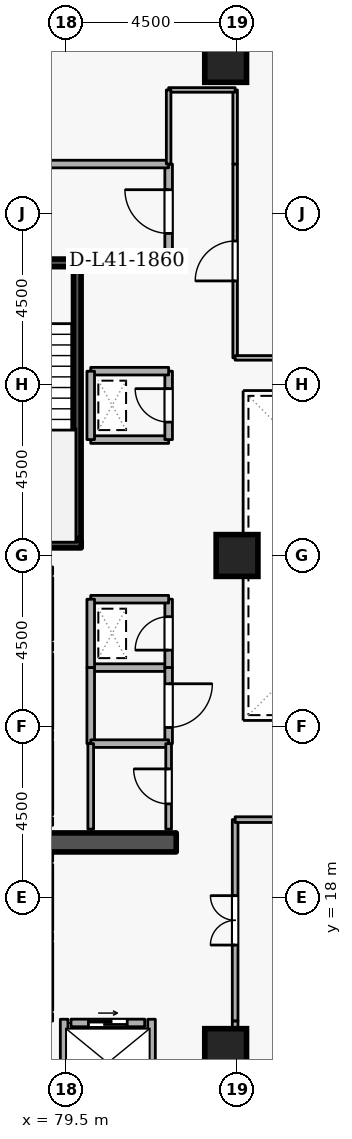
"""IFC4 building model, lengths in metres.
Left out: names, types, materials, properties, quantities, classifications, styles, units other than length and angle.
Written with IfcOpenShell. Run it as: python <this file> out.ifc"""

import sys

from ifc_helpers import new_model, si_unit, direction, frame, frame_2d, origin, origin_2d, place, context, subcontext, project, spatial, rectangle, extrude, element, fill, save


model = new_model("IFC4")
c1 = context("Model", 3, precision=1e-05, world=origin(), true_north=direction((0.0, 1.0)))
c2 = subcontext(c1, "Body", "Model", "MODEL_VIEW")
j1 = project(units=[si_unit("LENGTHUNIT", "METRE"), si_unit("PLANEANGLEUNIT", "RADIAN")], contexts=[c1])
p1 = place(None, origin())
s1 = spatial("IfcSite", under=j1, at=p1, CompositionType="ELEMENT")
p2 = place(p1, origin())
s2 = spatial("IfcBuilding", under=s1, at=p2, CompositionType="ELEMENT")
p3 = place(p2, frame((0.0, 0.0, 156.3)))
s3 = spatial("IfcBuildingStorey", under=s2, at=p3, CompositionType="ELEMENT", Elevation=156.3)
p4 = place(p3, frame((76.6, 19.45, 0.0), z_axis=(0.0, 0.0, 1.0), x_axis=(1.0, 0.0, 0.0)))
e1 = element("IfcWall", 1, at=p4, inside=s3, PredefinedType="SHEAR", context=c2, shape_type="SweptSolid", body=[
    extrude(rectangle(XDim=5.8, YDim=0.5, at=frame_2d((2.9, 0.0))), origin(), (0.0, 0.0, 1.0), 3.6),
])
for number, where, z_axis, x_axis in (
    (2, (83.7, 14.0, 0.0), (0.0, 0.0, 1.0), (1.0, 0.0, 0.0)),
    (3, (83.7, 40.0, 0.0), (0.0, 0.0, 1.0), (1.0, 0.0, 0.0)),
    (4, (84.0, 27.0, 0.0), (0.0, 0.0, 1.0), (1.0, 0.0, 0.0)),
):
    element("IfcColumn", number, at=place(p3, frame(where, z_axis=z_axis, x_axis=x_axis)), inside=s3, PredefinedType="COLUMN", context=c2, shape_type="SweptSolid", body=[
        extrude(rectangle(XDim=1.1, YDim=1.1, at=origin_2d()), origin(), (0.0, 0.0, 1.0), 3.6),
    ])
p5 = place(p3, frame((79.05, 24.78, 0.0), z_axis=(0.0, 0.0, 1.0), x_axis=(0.0, 1.0, 0.0)))
e5 = element("IfcWall", 5, at=p5, inside=s3, PredefinedType="STANDARD", context=c2, shape_type="SweptSolid", body=[
    extrude(rectangle(XDim=1.64, YDim=0.2, at=frame_2d((0.82, 0.0))), origin(), (0.0, 0.0, 1.0), 3.34),
])
p6 = place(p5, frame((0.31, 0.0, 0.0)))
e6 = element("IfcOpeningElement", 6, at=p6, cuts=e5, PredefinedType="OPENING", context=c2, shape_type="SweptSolid", body=[
    extrude(rectangle(XDim=1.02, YDim=2.06, at=frame_2d((0.51, 1.03))), frame((0.0, 0.11, 0.0), z_axis=(0.0, -1.0, 0.0), x_axis=(1.0, 0.0, 0.0)), (0.0, 0.0, 1.0), 0.22),
])
p7 = place(p3, frame((79.05, 22.43, 0.0), z_axis=(0.0, 0.0, 1.0), x_axis=(0.0, 1.0, 0.0)))
e7 = element("IfcWall", 7, at=p7, inside=s3, PredefinedType="STANDARD", context=c2, shape_type="SweptSolid", body=[
    extrude(rectangle(XDim=1.99, YDim=0.2, at=frame_2d((0.995, 0.0))), origin(), (0.0, 0.0, 1.0), 3.34),
])
p8 = place(p3, frame((79.05, 20.18, 0.0), z_axis=(0.0, 0.0, 1.0), x_axis=(0.0, 1.0, 0.0)))
e8 = element("IfcWall", 8, at=p8, inside=s3, PredefinedType="STANDARD", context=c2, shape_type="SweptSolid", body=[
    extrude(rectangle(XDim=1.94, YDim=0.2, at=frame_2d((0.97, 0.0))), origin(), (0.0, 0.0, 1.0), 3.34),
])
p9 = place(p3, frame((79.05, 17.13, 0.0), z_axis=(0.0, 0.0, 1.0), x_axis=(0.0, 1.0, 0.0)))
e9 = element("IfcWall", 9, at=p9, inside=s3, PredefinedType="STANDARD", context=c2, shape_type="SweptSolid", body=[
    extrude(rectangle(XDim=1.74, YDim=0.2, at=frame_2d((0.87, 0.0))), origin(), (0.0, 0.0, 1.0), 3.34),
])
p10 = place(p9, frame((0.36, 0.0, 0.0)))
e10 = element("IfcOpeningElement", 10, at=p10, cuts=e9, PredefinedType="OPENING", context=c2, shape_type="SweptSolid", body=[
    extrude(rectangle(XDim=1.02, YDim=2.06, at=frame_2d((0.51, 1.03))), frame((0.0, 0.11, 0.0), z_axis=(0.0, -1.0, 0.0), x_axis=(1.0, 0.0, 0.0)), (0.0, 0.0, 1.0), 0.22),
])
p11 = place(p3, frame((79.05, 15.03, 0.0), z_axis=(0.0, 0.0, 1.0), x_axis=(0.0, 1.0, 0.0)))
e11 = element("IfcWall", 11, at=p11, inside=s3, PredefinedType="STANDARD", context=c2, shape_type="SweptSolid", body=[
    extrude(rectangle(XDim=1.79, YDim=0.2, at=frame_2d((0.895, 0.0))), origin(), (0.0, 0.0, 1.0), 3.34),
])
p12 = place(p11, frame((0.385, 0.0, 0.0)))
e12 = element("IfcOpeningElement", 12, at=p12, cuts=e11, PredefinedType="OPENING", context=c2, shape_type="SweptSolid", body=[
    extrude(rectangle(XDim=1.02, YDim=2.06, at=frame_2d((0.51, 1.03))), frame((0.0, 0.11, 0.0), z_axis=(0.0, -1.0, 0.0), x_axis=(1.0, 0.0, 0.0)), (0.0, 0.0, 1.0), 0.22),
])
p13 = place(p3, frame((79.63, 14.7, 0.0), z_axis=(0.0, 0.0, 1.0), x_axis=(1.0, 0.0, 0.0)))
e13 = element("IfcWall", 13, at=p13, inside=s3, PredefinedType="STANDARD", context=c2, shape_type="SweptSolid", body=[
    extrude(rectangle(XDim=1.94, YDim=0.2, at=frame_2d((0.97, 0.0))), origin(), (0.0, 0.0, 1.0), 3.34),
])
p14 = place(p13, frame((0.46, 0.0, 0.0)))
e14 = element("IfcOpeningElement", 14, at=p14, cuts=e13, PredefinedType="OPENING", context=c2, shape_type="SweptSolid", body=[
    extrude(rectangle(XDim=1.02, YDim=2.06, at=frame_2d((0.51, 1.03))), frame((0.0, 0.11, 0.0), z_axis=(0.0, -1.0, 0.0), x_axis=(1.0, 0.0, 0.0)), (0.0, 0.0, 1.0), 0.22),
])
for number, where, z_axis, x_axis in (
    (15, (81.75, 12.612, 0.0), (0.0, 0.0, 1.0), (0.0, 1.0, 0.0)),
    (16, (79.45, 12.612, 0.0), (0.0, 0.0, 1.0), (0.0, 1.0, 0.0)),
):
    element("IfcWall", number, at=place(p3, frame(where, z_axis=z_axis, x_axis=x_axis)), inside=s3, PredefinedType="STANDARD", context=c2, shape_type="SweptSolid", body=[
        extrude(rectangle(XDim=2.186, YDim=0.2, at=frame_2d((1.093, 0.0))), origin(), (0.0, 0.0, 1.0), 3.34),
    ])
p15 = place(p3, frame((76.55, 34.7, 0.0), z_axis=(0.0, 0.0, 1.0), x_axis=(1.0, 0.0, 0.0)))
e17 = element("IfcWall", 17, at=p15, inside=s3, PredefinedType="SHEAR", context=c2, shape_type="SweptSolid", body=[
    extrude(rectangle(XDim=3.35, YDim=0.2, at=frame_2d((1.675, 0.0))), origin(), (0.0, 0.0, 1.0), 3.6),
])
p16 = place(p15, frame((1.125, 0.0, 0.0)))
e18 = element("IfcOpeningElement", 18, at=p16, cuts=e17, PredefinedType="OPENING", context=c2, shape_type="SweptSolid", body=[
    extrude(rectangle(XDim=1.1, YDim=2.1, at=frame_2d((0.55, 1.05))), frame((0.0, 0.11, 0.0), z_axis=(0.0, -1.0, 0.0), x_axis=(1.0, 0.0, 0.0)), (0.0, 0.0, 1.0), 0.22),
])
p17 = place(p3, frame((79.9, 27.3, 0.0), z_axis=(0.0, 0.0, 1.0), x_axis=(-1.0, 0.0, 0.0)))
e19 = element("IfcWall", 19, at=p17, inside=s3, PredefinedType="SHEAR", context=c2, shape_type="SweptSolid", body=[
    extrude(rectangle(XDim=3.35, YDim=0.2, at=frame_2d((1.675, 0.0))), origin(), (0.0, 0.0, 1.0), 3.6),
])
p18 = place(p3, frame((79.797, 27.45, 0.0), z_axis=(0.0, 0.0, 1.0), x_axis=(0.0, 1.0, 0.0)))
e20 = element("IfcWall", 20, at=p18, inside=s3, PredefinedType="SHEAR", context=c2, shape_type="SweptSolid", body=[
    extrude(rectangle(XDim=7.1, YDim=0.2, at=frame_2d((3.55, 0.0))), origin(), (0.0, 0.0, 1.0), 3.6),
])
p19 = place(p3, frame((79.9, 34.8, 0.0), z_axis=(0.0, 0.0, 1.0), x_axis=(1.0, 0.0, 0.0)))
e21 = element("IfcWall", 21, at=p19, inside=s3, PredefinedType="STANDARD", context=c2, shape_type="SweptSolid", body=[
    extrude(rectangle(XDim=2.3, YDim=0.2, at=frame_2d((1.15, 0.0))), origin(), (0.0, 0.0, 1.0), 2.545),
])
p20 = place(p3, frame((82.2, 34.8, 0.0), z_axis=(0.0, 0.0, 1.0), x_axis=(0.0, 1.0, 0.0)))
e22 = element("IfcWall", 22, at=p20, inside=s3, PredefinedType="STANDARD", context=c2, shape_type="SweptSolid", body=[
    extrude(rectangle(XDim=2.5, YDim=0.2, at=frame_2d((1.25, 0.0))), origin(), (0.0, 0.0, 1.0), 3.34),
])
p21 = place(p20, frame((0.675, 0.0, 0.0)))
e23 = element("IfcOpeningElement", 23, at=p21, cuts=e22, PredefinedType="OPENING", context=c2, shape_type="SweptSolid", body=[
    extrude(rectangle(XDim=1.15, YDim=2.1, at=frame_2d((0.575, 1.05))), frame((0.0, 0.11, 0.0), z_axis=(0.0, -1.0, 0.0), x_axis=(1.0, 0.0, 0.0)), (0.0, 0.0, 1.0), 0.22),
])
p22 = place(p3, frame((82.2, 37.3, 0.0), z_axis=(0.0, 0.0, 1.0), x_axis=(-1.0, 0.0, 0.0)))
e24 = element("IfcWall", 24, at=p22, inside=s3, PredefinedType="STANDARD", context=c2, shape_type="SweptSolid", body=[
    extrude(rectangle(XDim=5.7, YDim=0.2, at=frame_2d((2.85, 0.0))), origin(), (0.0, 0.0, 1.0), 3.34),
])
p23 = place(p3, frame((80.15, 24.05, 0.0), z_axis=(0.0, 0.0, 1.0), x_axis=(1.0, 0.0, 0.0)))
e25 = element("IfcWall", 25, at=p23, inside=s3, PredefinedType="STANDARD", context=c2, shape_type="SweptSolid", body=[
    extrude(rectangle(XDim=2.05, YDim=0.2, at=frame_2d((1.025, 0.0))), origin(), (0.0, 0.0, 1.0), 3.34),
])
p24 = place(p3, frame((82.2, 24.05, 0.0), z_axis=(0.0, 0.0, 1.0), x_axis=(0.0, 1.0, 0.0)))
e26 = element("IfcWall", 26, at=p24, inside=s3, PredefinedType="STANDARD", context=c2, shape_type="SweptSolid", body=[
    extrude(rectangle(XDim=1.8, YDim=0.2, at=frame_2d((0.9, 0.0))), origin(), (0.0, 0.0, 1.0), 3.34),
])
p25 = place(p24, frame((0.46, 0.0, 0.0)))
e27 = element("IfcOpeningElement", 27, at=p25, cuts=e26, PredefinedType="OPENING", context=c2, shape_type="SweptSolid", body=[
    extrude(rectangle(XDim=0.88, YDim=2.04, at=frame_2d((0.44, 1.02))), frame((0.0, 0.11, 0.0), z_axis=(0.0, -1.0, 0.0), x_axis=(1.0, 0.0, 0.0)), (0.0, 0.0, 1.0), 0.22),
])
p26 = place(p3, frame((82.2, 25.85, 0.0), z_axis=(0.0, 0.0, 1.0), x_axis=(-1.0, 0.0, 0.0)))
e28 = element("IfcWall", 28, at=p26, inside=s3, PredefinedType="STANDARD", context=c2, shape_type="SweptSolid", body=[
    extrude(rectangle(XDim=2.05, YDim=0.2, at=frame_2d((1.025, 0.0))), origin(), (0.0, 0.0, 1.0), 3.34),
])
p27 = place(p3, frame((80.15, 25.85, 0.0), z_axis=(0.0, 0.0, 1.0), x_axis=(0.0, -1.0, 0.0)))
e29 = element("IfcWall", 29, at=p27, inside=s3, PredefinedType="STANDARD", context=c2, shape_type="SweptSolid", body=[
    extrude(rectangle(XDim=1.8, YDim=0.2, at=frame_2d((0.9, 0.0))), origin(), (0.0, 0.0, 1.0), 3.34),
])
p28 = place(p3, frame((80.15, 30.05, 0.0), z_axis=(0.0, 0.0, 1.0), x_axis=(1.0, 0.0, 0.0)))
e30 = element("IfcWall", 30, at=p28, inside=s3, PredefinedType="STANDARD", context=c2, shape_type="SweptSolid", body=[
    extrude(rectangle(XDim=2.05, YDim=0.2, at=frame_2d((1.025, 0.0))), origin(), (0.0, 0.0, 1.0), 3.34),
])
p29 = place(p3, frame((82.2, 30.05, 0.0), z_axis=(0.0, 0.0, 1.0), x_axis=(0.0, 1.0, 0.0)))
e31 = element("IfcWall", 31, at=p29, inside=s3, PredefinedType="STANDARD", context=c2, shape_type="SweptSolid", body=[
    extrude(rectangle(XDim=1.8, YDim=0.2, at=frame_2d((0.9, 0.0))), origin(), (0.0, 0.0, 1.0), 3.34),
])
p30 = place(p29, frame((0.46, 0.0, 0.0)))
e32 = element("IfcOpeningElement", 32, at=p30, cuts=e31, PredefinedType="OPENING", context=c2, shape_type="SweptSolid", body=[
    extrude(rectangle(XDim=0.88, YDim=2.04, at=frame_2d((0.44, 1.02))), frame((0.0, 0.11, 0.0), z_axis=(0.0, -1.0, 0.0), x_axis=(1.0, 0.0, 0.0)), (0.0, 0.0, 1.0), 0.22),
])
p31 = place(p3, frame((82.2, 31.85, 0.0), z_axis=(0.0, 0.0, 1.0), x_axis=(-1.0, 0.0, 0.0)))
e33 = element("IfcWall", 33, at=p31, inside=s3, PredefinedType="STANDARD", context=c2, shape_type="SweptSolid", body=[
    extrude(rectangle(XDim=2.05, YDim=0.2, at=frame_2d((1.025, 0.0))), origin(), (0.0, 0.0, 1.0), 3.34),
])
p32 = place(p3, frame((80.15, 31.85, 0.0), z_axis=(0.0, 0.0, 1.0), x_axis=(0.0, -1.0, 0.0)))
e34 = element("IfcWall", 34, at=p32, inside=s3, PredefinedType="STANDARD", context=c2, shape_type="SweptSolid", body=[
    extrude(rectangle(XDim=1.8, YDim=0.2, at=frame_2d((0.9, 0.0))), origin(), (0.0, 0.0, 1.0), 3.34),
])
p33 = place(p3, frame((80.15, 22.05, 0.0), z_axis=(0.0, 0.0, 1.0), x_axis=(0.0, 1.0, 0.0)))
e35 = element("IfcWall", 35, at=p33, inside=s3, PredefinedType="STANDARD", context=c2, shape_type="SweptSolid", body=[
    extrude(rectangle(XDim=2.0, YDim=0.2, at=frame_2d((1.0, 0.0))), origin(), (0.0, 0.0, 1.0), 3.34),
])
p34 = place(p3, frame((82.2, 24.05, 0.0), z_axis=(0.0, 0.0, 1.0), x_axis=(0.0, -1.0, 0.0)))
e36 = element("IfcWall", 36, at=p34, inside=s3, PredefinedType="STANDARD", context=c2, shape_type="SweptSolid", body=[
    extrude(rectangle(XDim=2.0, YDim=0.2, at=frame_2d((1.0, 0.0))), origin(), (0.0, 0.0, 1.0), 3.34),
])
p35 = place(p34, frame((0.425, 0.0, 0.0)))
e37 = element("IfcOpeningElement", 37, at=p35, cuts=e36, PredefinedType="OPENING", context=c2, shape_type="SweptSolid", body=[
    extrude(rectangle(XDim=1.15, YDim=2.1, at=frame_2d((0.575, 1.05))), frame((0.0, 0.11, 0.0), z_axis=(0.0, -1.0, 0.0), x_axis=(1.0, 0.0, 0.0)), (0.0, 0.0, 1.0), 0.22),
])
p36 = place(p3, frame((82.2, 22.05, 0.0), z_axis=(0.0, 0.0, 1.0), x_axis=(-1.0, 0.0, 0.0)))
e38 = element("IfcWall", 38, at=p36, inside=s3, PredefinedType="STANDARD", context=c2, shape_type="SweptSolid", body=[
    extrude(rectangle(XDim=2.05, YDim=0.2, at=frame_2d((1.025, 0.0))), origin(), (0.0, 0.0, 1.0), 3.34),
])
p37 = place(p3, frame((82.2, 19.8, 0.0), z_axis=(0.0, 0.0, 1.0), x_axis=(0.0, 1.0, 0.0)))
e39 = element("IfcWall", 39, at=p37, inside=s3, PredefinedType="PARTITIONING", context=c2, shape_type="SweptSolid", body=[
    extrude(rectangle(XDim=2.25, YDim=0.15, at=frame_2d((1.125, 0.0))), origin(), (0.0, 0.0, 1.0), 3.34),
])
p38 = place(p37, frame((0.665, 0.0, 0.0)))
e40 = element("IfcOpeningElement", 40, at=p38, cuts=e39, PredefinedType="OPENING", context=c2, shape_type="SweptSolid", body=[
    extrude(rectangle(XDim=0.92, YDim=2.08, at=frame_2d((0.46, 1.04))), frame((0.0, 0.085, 0.0), z_axis=(0.0, -1.0, 0.0), x_axis=(1.0, 0.0, 0.0)), (0.0, 0.0, 1.0), 0.17),
])
p39 = place(p3, frame((80.15, 22.05, 0.0), z_axis=(0.0, 0.0, 1.0), x_axis=(0.0, -1.0, 0.0)))
e41 = element("IfcWall", 41, at=p39, inside=s3, PredefinedType="PARTITIONING", context=c2, shape_type="SweptSolid", body=[
    extrude(rectangle(XDim=2.25, YDim=0.15, at=frame_2d((1.125, 0.0))), origin(), (0.0, 0.0, 1.0), 3.34),
])
p40 = place(p3, frame((83.95, 14.75, 0.0), z_axis=(0.0, 0.0, 1.0), x_axis=(0.0, 1.0, 0.0)))
e42 = element("IfcWall", 42, at=p40, inside=s3, PredefinedType="PARTITIONING", context=c2, shape_type="SweptSolid", body=[
    extrude(rectangle(XDim=5.3, YDim=0.15, at=frame_2d((2.65, 0.0))), origin(), (0.0, 0.0, 1.0), 3.34),
])
p41 = place(p40, frame((2.0, 0.0, 0.0)))
e43 = element("IfcOpeningElement", 43, at=p41, cuts=e42, PredefinedType="OPENING", context=c2, shape_type="SweptSolid", body=[
    extrude(rectangle(XDim=1.3, YDim=2.12, at=frame_2d((0.65, 1.06))), frame((0.0, 0.085, 0.0), z_axis=(0.0, -1.0, 0.0), x_axis=(1.0, 0.0, 0.0)), (0.0, 0.0, 1.0), 0.17),
])
p42 = place(p3, frame((83.95, 20.05, 0.0), z_axis=(0.0, 0.0, 1.0), x_axis=(1.0, 0.0, 0.0)))
e44 = element("IfcWall", 44, at=p42, inside=s3, PredefinedType="PARTITIONING", context=c2, shape_type="SweptSolid", body=[
    extrude(rectangle(XDim=4.55, YDim=0.15, at=frame_2d((2.275, 0.0))), origin(), (0.0, 0.0, 1.0), 3.34),
])
p43 = place(p3, frame((83.95, 12.4, 0.0), z_axis=(0.0, 0.0, 1.0), x_axis=(0.0, 1.0, 0.0)))
e45 = element("IfcWall", 45, at=p43, inside=s3, PredefinedType="PARTITIONING", context=c2, shape_type="SweptSolid", body=[
    extrude(rectangle(XDim=2.35, YDim=0.15, at=frame_2d((1.175, 0.0))), origin(), (0.0, 0.0, 1.0), 3.34),
])
p44 = place(p3, frame((83.95, 32.2, 0.0), z_axis=(0.0, 0.0, 1.0), x_axis=(0.0, 1.0, 0.0)))
e46 = element("IfcWall", 46, at=p44, inside=s3, PredefinedType="PARTITIONING", context=c2, shape_type="SweptSolid", body=[
    extrude(rectangle(XDim=5.1, YDim=0.12, at=frame_2d((2.55, 0.0))), origin(), (0.0, 0.0, 1.0), 3.34),
])
p45 = place(p44, frame((2.025, 0.0, 0.0)))
e47 = element("IfcOpeningElement", 47, at=p45, cuts=e46, PredefinedType="OPENING", context=c2, shape_type="SweptSolid", body=[
    extrude(rectangle(XDim=1.05, YDim=2.1, at=frame_2d((0.525, 1.05))), frame((0.0, 0.07, 0.0), z_axis=(0.0, -1.0, 0.0), x_axis=(1.0, 0.0, 0.0)), (0.0, 0.0, 1.0), 0.14),
])
p46 = place(p3, frame((83.95, 37.3, 0.0), z_axis=(0.0, 0.0, 1.0), x_axis=(0.0, 1.0, 0.0)))
e48 = element("IfcWall", 48, at=p46, inside=s3, PredefinedType="PARTITIONING", context=c2, shape_type="SweptSolid", body=[
    extrude(rectangle(XDim=1.95, YDim=0.12, at=frame_2d((0.975, 0.0))), origin(), (0.0, 0.0, 1.0), 3.34),
])
p47 = place(p3, frame((83.95, 39.25, 0.0), z_axis=(0.0, 0.0, 1.0), x_axis=(-1.0, 0.0, 0.0)))
e49 = element("IfcWall", 49, at=p47, inside=s3, PredefinedType="PARTITIONING", context=c2, shape_type="SweptSolid", body=[
    extrude(rectangle(XDim=1.75, YDim=0.12, at=frame_2d((0.875, 0.0))), origin(), (0.0, 0.0, 1.0), 3.34),
])
p48 = place(p3, frame((82.2, 39.25, 0.0), z_axis=(0.0, 0.0, 1.0), x_axis=(0.0, -1.0, 0.0)))
e50 = element("IfcWall", 50, at=p48, inside=s3, PredefinedType="PARTITIONING", context=c2, shape_type="SweptSolid", body=[
    extrude(rectangle(XDim=1.95, YDim=0.12, at=frame_2d((0.975, 0.0))), origin(), (0.0, 0.0, 1.0), 3.34),
])
p49 = place(p3, frame((88.5, 32.2, 0.0), z_axis=(0.0, 0.0, 1.0), x_axis=(-1.0, 0.0, 0.0)))
e51 = element("IfcWall", 51, at=p49, inside=s3, PredefinedType="PARTITIONING", context=c2, shape_type="SweptSolid", body=[
    extrude(rectangle(XDim=4.55, YDim=0.12, at=frame_2d((2.275, 0.0))), origin(), (0.0, 0.0, 1.0), 3.34),
])
p50 = place(p14, origin())
e52 = element("IfcDoor", 52, at=p50, inside=s3, OperationType="SLIDING_TO_LEFT", PredefinedType="DOOR", context=c2, shape_type="SweptSolid", body=[
    extrude(rectangle(XDim=1.02, YDim=2.06, at=frame_2d((0.51, 1.03))), frame((0.0, 0.025, 0.0), z_axis=(0.0, -1.0, 0.0), x_axis=(1.0, 0.0, 0.0)), (0.0, 0.0, 1.0), 0.05),
])
fill(e14, e52)
p51 = place(p21, origin())
e53 = element("IfcDoor", 53, at=p51, inside=s3, OperationType="SINGLE_SWING_RIGHT", PredefinedType="DOOR", context=c2, shape_type="SweptSolid", body=[
    extrude(rectangle(XDim=1.15, YDim=2.1, at=frame_2d((0.575, 1.05))), frame((0.0, 0.025, 0.0), z_axis=(0.0, -1.0, 0.0), x_axis=(1.0, 0.0, 0.0)), (0.0, 0.0, 1.0), 0.05),
])
fill(e23, e53)
p52 = place(p25, origin())
e54 = element("IfcDoor", 54, at=p52, inside=s3, OperationType="SINGLE_SWING_LEFT", PredefinedType="DOOR", context=c2, shape_type="SweptSolid", body=[
    extrude(rectangle(XDim=0.88, YDim=2.04, at=frame_2d((0.44, 1.02))), frame((0.0, 0.025, 0.0), z_axis=(0.0, -1.0, 0.0), x_axis=(1.0, 0.0, 0.0)), (0.0, 0.0, 1.0), 0.05),
])
fill(e27, e54)
p53 = place(p30, origin())
e55 = element("IfcDoor", 55, at=p53, inside=s3, OperationType="SINGLE_SWING_RIGHT", PredefinedType="DOOR", context=c2, shape_type="SweptSolid", body=[
    extrude(rectangle(XDim=0.88, YDim=2.04, at=frame_2d((0.44, 1.02))), frame((0.0, 0.025, 0.0), z_axis=(0.0, -1.0, 0.0), x_axis=(1.0, 0.0, 0.0)), (0.0, 0.0, 1.0), 0.05),
])
fill(e32, e55)
p54 = place(p38, origin())
e56 = element("IfcDoor", 56, at=p54, inside=s3, OperationType="SINGLE_SWING_RIGHT", PredefinedType="DOOR", context=c2, shape_type="SweptSolid", body=[
    extrude(rectangle(XDim=0.92, YDim=2.08, at=frame_2d((0.46, 1.04))), frame((0.0, 0.025, 0.0), z_axis=(0.0, -1.0, 0.0), x_axis=(1.0, 0.0, 0.0)), (0.0, 0.0, 1.0), 0.05),
])
fill(e40, e56)
p55 = place(p35, origin())
e57 = element("IfcDoor", 57, at=p55, inside=s3, OperationType="SINGLE_SWING_LEFT", PredefinedType="DOOR", context=c2, shape_type="SweptSolid", body=[
    extrude(rectangle(XDim=1.15, YDim=2.1, at=frame_2d((0.575, 1.05))), frame((0.0, 0.025, 0.0), z_axis=(0.0, -1.0, 0.0), x_axis=(1.0, 0.0, 0.0)), (0.0, 0.0, 1.0), 0.05),
])
fill(e37, e57)
p56 = place(p41, origin())
e58 = element("IfcDoor", 58, at=p56, inside=s3, OperationType="DOUBLE_DOOR_SINGLE_SWING", PredefinedType="DOOR", context=c2, shape_type="SweptSolid", body=[
    extrude(rectangle(XDim=1.3, YDim=2.12, at=frame_2d((0.65, 1.06))), frame((0.0, 0.025, 0.0), z_axis=(0.0, -1.0, 0.0), x_axis=(1.0, 0.0, 0.0)), (0.0, 0.0, 1.0), 0.05),
])
fill(e43, e58)
p57 = place(p45, origin())
e59 = element("IfcDoor", 59, at=p57, inside=s3, OperationType="SINGLE_SWING_LEFT", PredefinedType="DOOR", context=c2, shape_type="SweptSolid", body=[
    extrude(rectangle(XDim=1.05, YDim=2.1, at=frame_2d((0.525, 1.05))), frame((0.0, 0.025, 0.0), z_axis=(0.0, -1.0, 0.0), x_axis=(1.0, 0.0, 0.0)), (0.0, 0.0, 1.0), 0.05),
])
fill(e47, e59)
save(model, sys.argv[1])
